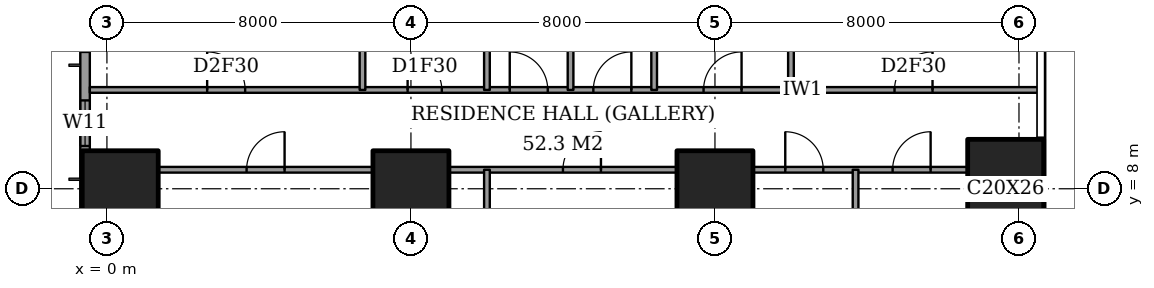
"""IFC4 building model, lengths in metres.
Left out: names, types, materials, properties, quantities, classifications, styles, units other than length and angle.
Written with IfcOpenShell. Run it as: python <this file> out.ifc"""

import sys

from ifc_helpers import new_model, si_unit, direction, frame, frame_2d, origin, origin_2d, place, context, subcontext, project, spatial, rectangle, extrude, element, fill, save


model = new_model("IFC4")
c1 = context("Model", 3, precision=1e-05, world=origin(), true_north=direction((0.0, 1.0)))
c2 = subcontext(c1, "Body", "Model", "MODEL_VIEW")
j1 = project(units=[si_unit("LENGTHUNIT", "METRE"), si_unit("PLANEANGLEUNIT", "RADIAN")], contexts=[c1])
p1 = place(None, origin())
s1 = spatial("IfcSite", under=j1, at=p1, CompositionType="ELEMENT")
p2 = place(p1, origin())
s2 = spatial("IfcBuilding", under=s1, at=p2, CompositionType="ELEMENT")
p3 = place(p2, frame((0.0, 0.0, 121.4)))
s3 = spatial("IfcBuildingStorey", under=s2, at=p3, CompositionType="ELEMENT", Elevation=121.4)
for number, where, z_axis, x_axis in (
    (1, (0.35, 8.0, 0.0), (0.0, 0.0, 1.0), (1.0, 0.0, 0.0)),
    (2, (8.0, 8.0, 0.0), (0.0, 0.0, 1.0), (1.0, 0.0, 0.0)),
    (3, (16.0, 8.0, 0.0), (0.0, 0.0, 1.0), (1.0, 0.0, 0.0)),
):
    element("IfcColumn", number, at=place(p3, frame(where, z_axis=z_axis, x_axis=x_axis)), inside=s3, PredefinedType="COLUMN", context=c2, shape_type="SweptSolid", body=[
        extrude(rectangle(XDim=2.0, YDim=2.0, at=origin_2d()), origin(), (0.0, 0.0, 1.0), 3.6),
    ])
p4 = place(p3, frame((23.65, 8.0, 0.0), z_axis=(0.0, 0.0, 1.0), x_axis=(1.0, 0.0, 0.0)))
e4 = element("IfcColumn", 4, at=p4, inside=s3, PredefinedType="COLUMN", context=c2, shape_type="SweptSolid", body=[
    extrude(rectangle(XDim=2.0, YDim=2.6, at=origin_2d()), origin(), (0.0, 0.0, 1.0), 3.6),
])
p5 = place(p3, frame((-0.575, 44.825, 0.0), z_axis=(0.0, 0.0, 1.0), x_axis=(0.0, -1.0, 0.0)))
e5 = element("IfcWall", 5, at=p5, inside=s3, PredefinedType="SOLIDWALL", context=c2, shape_type="SweptSolid", body=[
    extrude(rectangle(XDim=41.65, YDim=0.25, at=frame_2d((20.825, 0.0))), origin(), (0.0, 0.0, 1.0), 3.6),
])
p6 = place(p5, frame((0.775, 0.0, 0.4)))
e6 = element("IfcOpeningElement", 6, at=p6, cuts=e5, PredefinedType="OPENING", context=c2, shape_type="SweptSolid", body=[
    extrude(rectangle(XDim=2.4, YDim=2.2, at=frame_2d((1.2, 1.1))), frame((0.0, 0.135, 0.0), z_axis=(0.0, -1.0, 0.0), x_axis=(1.0, 0.0, 0.0)), (0.0, 0.0, 1.0), 0.27),
])
p7 = place(p5, frame((6.1, 0.0, 0.4)))
e7 = element("IfcOpeningElement", 7, at=p7, cuts=e5, PredefinedType="OPENING", context=c2, shape_type="SweptSolid", body=[
    extrude(rectangle(XDim=1.2, YDim=2.2, at=frame_2d((0.6, 1.1))), frame((0.0, 0.135, 0.0), z_axis=(0.0, -1.0, 0.0), x_axis=(1.0, 0.0, 0.0)), (0.0, 0.0, 1.0), 0.27),
])
p8 = place(p5, frame((8.225, 0.0, 0.4)))
e8 = element("IfcOpeningElement", 8, at=p8, cuts=e5, PredefinedType="OPENING", context=c2, shape_type="SweptSolid", body=[
    extrude(rectangle(XDim=2.4, YDim=2.2, at=frame_2d((1.2, 1.1))), frame((0.0, 0.135, 0.0), z_axis=(0.0, -1.0, 0.0), x_axis=(1.0, 0.0, 0.0)), (0.0, 0.0, 1.0), 0.27),
])
p9 = place(p5, frame((15.625, 0.0, 0.4)))
e9 = element("IfcOpeningElement", 9, at=p9, cuts=e5, PredefinedType="OPENING", context=c2, shape_type="SweptSolid", body=[
    extrude(rectangle(XDim=2.4, YDim=2.2, at=frame_2d((1.2, 1.1))), frame((0.0, 0.135, 0.0), z_axis=(0.0, -1.0, 0.0), x_axis=(1.0, 0.0, 0.0)), (0.0, 0.0, 1.0), 0.27),
])
p10 = place(p5, frame((23.625, 0.0, 0.4)))
e10 = element("IfcOpeningElement", 10, at=p10, cuts=e5, PredefinedType="OPENING", context=c2, shape_type="SweptSolid", body=[
    extrude(rectangle(XDim=2.4, YDim=2.2, at=frame_2d((1.2, 1.1))), frame((0.0, 0.135, 0.0), z_axis=(0.0, -1.0, 0.0), x_axis=(1.0, 0.0, 0.0)), (0.0, 0.0, 1.0), 0.27),
])
p11 = place(p5, frame((30.825, 0.0, 0.4)))
e11 = element("IfcOpeningElement", 11, at=p11, cuts=e5, PredefinedType="OPENING", context=c2, shape_type="SweptSolid", body=[
    extrude(rectangle(XDim=2.4, YDim=2.2, at=frame_2d((1.2, 1.1))), frame((0.0, 0.135, 0.0), z_axis=(0.0, -1.0, 0.0), x_axis=(1.0, 0.0, 0.0)), (0.0, 0.0, 1.0), 0.27),
])
p12 = place(p5, frame((34.5, 0.0, 0.4)))
e12 = element("IfcOpeningElement", 12, at=p12, cuts=e5, PredefinedType="OPENING", context=c2, shape_type="SweptSolid", body=[
    extrude(rectangle(XDim=1.2, YDim=2.2, at=frame_2d((0.6, 1.1))), frame((0.0, 0.135, 0.0), z_axis=(0.0, -1.0, 0.0), x_axis=(1.0, 0.0, 0.0)), (0.0, 0.0, 1.0), 0.27),
])
p13 = place(p5, frame((38.475, 0.0, 0.4)))
e13 = element("IfcOpeningElement", 13, at=p13, cuts=e5, PredefinedType="OPENING", context=c2, shape_type="SweptSolid", body=[
    extrude(rectangle(XDim=2.4, YDim=2.2, at=frame_2d((1.2, 1.1))), frame((0.0, 0.135, 0.0), z_axis=(0.0, -1.0, 0.0), x_axis=(1.0, 0.0, 0.0)), (0.0, 0.0, 1.0), 0.27),
])
p14 = place(p3, frame((1.35, 8.5, 0.0), z_axis=(0.0, 0.0, 1.0), x_axis=(1.0, 0.0, 0.0)))
e14 = element("IfcWall", 14, at=p14, inside=s3, PredefinedType="PARTITIONING", context=c2, shape_type="SweptSolid", body=[
    extrude(rectangle(XDim=5.65, YDim=0.15, at=frame_2d((2.825, 0.0))), origin(), (0.0, 0.0, 1.0), 3.35),
])
p15 = place(p14, frame((2.325, 0.0, 0.0)))
e15 = element("IfcOpeningElement", 15, at=p15, cuts=e14, PredefinedType="OPENING", context=c2, shape_type="SweptSolid", body=[
    extrude(rectangle(XDim=1.0, YDim=2.1, at=frame_2d((0.5, 1.05))), frame((0.0, 0.085, 0.0), z_axis=(0.0, -1.0, 0.0), x_axis=(1.0, 0.0, 0.0)), (0.0, 0.0, 1.0), 0.17),
])
p16 = place(p3, frame((9.0, 8.5, 0.0), z_axis=(0.0, 0.0, 1.0), x_axis=(1.0, 0.0, 0.0)))
e16 = element("IfcWall", 16, at=p16, inside=s3, PredefinedType="PARTITIONING", context=c2, shape_type="SweptSolid", body=[
    extrude(rectangle(XDim=6.0, YDim=0.15, at=frame_2d((3.0, 0.0))), origin(), (0.0, 0.0, 1.0), 3.35),
])
p17 = place(p16, frame((3.0, 0.0, 0.0)))
e17 = element("IfcOpeningElement", 17, at=p17, cuts=e16, PredefinedType="OPENING", context=c2, shape_type="SweptSolid", body=[
    extrude(rectangle(XDim=1.0, YDim=2.1, at=frame_2d((0.5, 1.05))), frame((0.0, 0.085, 0.0), z_axis=(0.0, -1.0, 0.0), x_axis=(1.0, 0.0, 0.0)), (0.0, 0.0, 1.0), 0.17),
])
p18 = place(p3, frame((17.0, 8.5, 0.0), z_axis=(0.0, 0.0, 1.0), x_axis=(1.0, 0.0, 0.0)))
e18 = element("IfcWall", 18, at=p18, inside=s3, PredefinedType="PARTITIONING", context=c2, shape_type="SweptSolid", body=[
    extrude(rectangle(XDim=5.65, YDim=0.15, at=frame_2d((2.825, 0.0))), origin(), (0.0, 0.0, 1.0), 3.35),
])
p19 = place(p18, frame((0.85, 0.0, 0.0)))
e19 = element("IfcOpeningElement", 19, at=p19, cuts=e18, PredefinedType="OPENING", context=c2, shape_type="SweptSolid", body=[
    extrude(rectangle(XDim=1.0, YDim=2.1, at=frame_2d((0.5, 1.05))), frame((0.0, 0.085, 0.0), z_axis=(0.0, -1.0, 0.0), x_axis=(1.0, 0.0, 0.0)), (0.0, 0.0, 1.0), 0.17),
])
p20 = place(p18, frame((3.675, 0.0, 0.0)))
e20 = element("IfcOpeningElement", 20, at=p20, cuts=e18, PredefinedType="OPENING", context=c2, shape_type="SweptSolid", body=[
    extrude(rectangle(XDim=1.0, YDim=2.1, at=frame_2d((0.5, 1.05))), frame((0.0, 0.085, 0.0), z_axis=(0.0, -1.0, 0.0), x_axis=(1.0, 0.0, 0.0)), (0.0, 0.0, 1.0), 0.17),
])
p21 = place(p3, frame((-0.45, 10.6, 0.0), z_axis=(0.0, 0.0, 1.0), x_axis=(1.0, 0.0, 0.0)))
e21 = element("IfcWall", 21, at=p21, inside=s3, PredefinedType="PARTITIONING", context=c2, shape_type="SweptSolid", body=[
    extrude(rectangle(XDim=25.011, YDim=0.15, at=frame_2d((12.505, 0.0))), origin(), (0.0, 0.0, 1.0), 3.35),
])
p22 = place(p21, frame((13.25, 0.0, 0.0)))
e22 = element("IfcOpeningElement", 22, at=p22, cuts=e21, PredefinedType="OPENING", context=c2, shape_type="SweptSolid", body=[
    extrude(rectangle(XDim=1.0, YDim=2.1, at=frame_2d((0.5, 1.05))), frame((0.0, 0.085, 0.0), z_axis=(0.0, -1.0, 0.0), x_axis=(1.0, 0.0, 0.0)), (0.0, 0.0, 1.0), 0.17),
])
p23 = place(p21, frame((3.087, 0.0, 0.0)))
e23 = element("IfcOpeningElement", 23, at=p23, cuts=e21, PredefinedType="OPENING", context=c2, shape_type="SweptSolid", body=[
    extrude(rectangle(XDim=1.0, YDim=2.1, at=frame_2d((0.5, 1.05))), frame((0.0, 0.085, 0.0), z_axis=(0.0, -1.0, 0.0), x_axis=(1.0, 0.0, 0.0)), (0.0, 0.0, 1.0), 0.17),
])
p24 = place(p21, frame((8.363, 0.0, 0.0)))
e24 = element("IfcOpeningElement", 24, at=p24, cuts=e21, PredefinedType="OPENING", context=c2, shape_type="SweptSolid", body=[
    extrude(rectangle(XDim=0.9, YDim=2.1, at=frame_2d((0.45, 1.05))), frame((0.0, 0.085, 0.0), z_axis=(0.0, -1.0, 0.0), x_axis=(1.0, 0.0, 0.0)), (0.0, 0.0, 1.0), 0.17),
])
p25 = place(p21, frame((11.05, 0.0, 0.0)))
e25 = element("IfcOpeningElement", 25, at=p25, cuts=e21, PredefinedType="OPENING", context=c2, shape_type="SweptSolid", body=[
    extrude(rectangle(XDim=1.0, YDim=2.1, at=frame_2d((0.5, 1.05))), frame((0.0, 0.085, 0.0), z_axis=(0.0, -1.0, 0.0), x_axis=(1.0, 0.0, 0.0)), (0.0, 0.0, 1.0), 0.17),
])
p26 = place(p21, frame((16.15, 0.0, 0.0)))
e26 = element("IfcOpeningElement", 26, at=p26, cuts=e21, PredefinedType="OPENING", context=c2, shape_type="SweptSolid", body=[
    extrude(rectangle(XDim=1.0, YDim=2.1, at=frame_2d((0.5, 1.05))), frame((0.0, 0.085, 0.0), z_axis=(0.0, -1.0, 0.0), x_axis=(1.0, 0.0, 0.0)), (0.0, 0.0, 1.0), 0.17),
])
p27 = place(p21, frame((21.175, 0.0, 0.0)))
e27 = element("IfcOpeningElement", 27, at=p27, cuts=e21, PredefinedType="OPENING", context=c2, shape_type="SweptSolid", body=[
    extrude(rectangle(XDim=1.0, YDim=2.1, at=frame_2d((0.5, 1.05))), frame((0.0, 0.085, 0.0), z_axis=(0.0, -1.0, 0.0), x_axis=(1.0, 0.0, 0.0)), (0.0, 0.0, 1.0), 0.17),
])
p28 = place(p3, frame((6.725, 10.6, 0.0), z_axis=(0.0, 0.0, 1.0), x_axis=(0.0, 1.0, 0.0)))
e28 = element("IfcWall", 28, at=p28, inside=s3, PredefinedType="PARTITIONING", context=c2, shape_type="SweptSolid", body=[
    extrude(rectangle(XDim=4.2, YDim=0.15, at=frame_2d((2.1, 0.0))), origin(), (0.0, 0.0, 1.0), 3.35),
])
p29 = place(p3, frame((10.0, -0.45, 0.0), z_axis=(0.0, 0.0, 1.0), x_axis=(0.0, 1.0, 0.0)))
e29 = element("IfcWall", 29, at=p29, inside=s3, PredefinedType="PARTITIONING", context=c2, shape_type="SweptSolid", body=[
    extrude(rectangle(XDim=8.95, YDim=0.15, at=frame_2d((4.475, 0.0))), origin(), (0.0, 0.0, 1.0), 3.35),
])
p30 = place(p3, frame((10.0, 10.6, 0.0), z_axis=(0.0, 0.0, 1.0), x_axis=(0.0, 1.0, 0.0)))
e30 = element("IfcWall", 30, at=p30, inside=s3, PredefinedType="PARTITIONING", context=c2, shape_type="SweptSolid", body=[
    extrude(rectangle(XDim=11.0, YDim=0.15, at=frame_2d((5.5, 0.0))), origin(), (0.0, 0.0, 1.0), 3.35),
])
p31 = place(p30, frame((8.2, 0.0, 0.0)))
e31 = element("IfcOpeningElement", 31, at=p31, cuts=e30, PredefinedType="OPENING", context=c2, shape_type="SweptSolid", body=[
    extrude(rectangle(XDim=1.0, YDim=2.1, at=frame_2d((0.5, 1.05))), frame((0.0, 0.085, 0.0), z_axis=(0.0, -1.0, 0.0), x_axis=(1.0, 0.0, 0.0)), (0.0, 0.0, 1.0), 0.17),
])
for number, where, z_axis, x_axis in (
    (32, (12.2, 10.6, 0.0), (0.0, 0.0, 1.0), (0.0, 1.0, 0.0)),
    (33, (14.4, 10.6, 0.0), (0.0, 0.0, 1.0), (0.0, 1.0, 0.0)),
    (34, (18.0, 10.6, 0.0), (0.0, 0.0, 1.0), (0.0, 1.0, 0.0)),
):
    element("IfcWall", number, at=place(p3, frame(where, z_axis=z_axis, x_axis=x_axis)), inside=s3, PredefinedType="PARTITIONING", context=c2, shape_type="SweptSolid", body=[
        extrude(rectangle(XDim=6.4, YDim=0.15, at=frame_2d((3.2, 0.0))), origin(), (0.0, 0.0, 1.0), 3.35),
    ])
p32 = place(p3, frame((19.7, -0.45, 0.0), z_axis=(0.0, 0.0, 1.0), x_axis=(0.0, 1.0, 0.0)))
e35 = element("IfcWall", 35, at=p32, inside=s3, PredefinedType="PARTITIONING", context=c2, shape_type="SweptSolid", body=[
    extrude(rectangle(XDim=8.95, YDim=0.15, at=frame_2d((4.475, 0.0))), origin(), (0.0, 0.0, 1.0), 3.35),
])
p33 = place(p12, origin())
e36 = element("IfcWindow", 36, at=p33, inside=s3, PartitioningType="SINGLE_PANEL", PredefinedType="WINDOW", context=c2, shape_type="SweptSolid", body=[
    extrude(rectangle(XDim=1.2, YDim=2.2, at=frame_2d((0.6, 1.1))), frame((0.0, 0.03, 0.0), z_axis=(0.0, -1.0, 0.0), x_axis=(1.0, 0.0, 0.0)), (0.0, 0.0, 1.0), 0.06),
])
fill(e12, e36)
p34 = place(p15, origin())
e37 = element("IfcDoor", 37, at=p34, inside=s3, OperationType="SINGLE_SWING_LEFT", PredefinedType="DOOR", context=c2, shape_type="SweptSolid", body=[
    extrude(rectangle(XDim=1.0, YDim=2.1, at=frame_2d((0.5, 1.05))), frame((0.0, 0.025, 0.0), z_axis=(0.0, -1.0, 0.0), x_axis=(1.0, 0.0, 0.0)), (0.0, 0.0, 1.0), 0.05),
])
fill(e15, e37)
p35 = place(p17, origin())
e38 = element("IfcDoor", 38, at=p35, inside=s3, OperationType="SINGLE_SWING_LEFT", PredefinedType="DOOR", context=c2, shape_type="SweptSolid", body=[
    extrude(rectangle(XDim=1.0, YDim=2.1, at=frame_2d((0.5, 1.05))), frame((0.0, 0.025, 0.0), z_axis=(0.0, -1.0, 0.0), x_axis=(1.0, 0.0, 0.0)), (0.0, 0.0, 1.0), 0.05),
])
fill(e17, e38)
p36 = place(p19, origin())
e39 = element("IfcDoor", 39, at=p36, inside=s3, OperationType="SINGLE_SWING_RIGHT", PredefinedType="DOOR", context=c2, shape_type="SweptSolid", body=[
    extrude(rectangle(XDim=1.0, YDim=2.1, at=frame_2d((0.5, 1.05))), frame((0.0, 0.025, 0.0), z_axis=(0.0, -1.0, 0.0), x_axis=(1.0, 0.0, 0.0)), (0.0, 0.0, 1.0), 0.05),
])
fill(e19, e39)
p37 = place(p20, origin())
e40 = element("IfcDoor", 40, at=p37, inside=s3, OperationType="SINGLE_SWING_LEFT", PredefinedType="DOOR", context=c2, shape_type="SweptSolid", body=[
    extrude(rectangle(XDim=1.0, YDim=2.1, at=frame_2d((0.5, 1.05))), frame((0.0, 0.025, 0.0), z_axis=(0.0, -1.0, 0.0), x_axis=(1.0, 0.0, 0.0)), (0.0, 0.0, 1.0), 0.05),
])
fill(e20, e40)
p38 = place(p22, origin())
e41 = element("IfcDoor", 41, at=p38, inside=s3, OperationType="SINGLE_SWING_LEFT", PredefinedType="DOOR", context=c2, shape_type="SweptSolid", body=[
    extrude(rectangle(XDim=1.0, YDim=2.1, at=frame_2d((0.5, 1.05))), frame((0.0, 0.025, 0.0), z_axis=(0.0, -1.0, 0.0), x_axis=(1.0, 0.0, 0.0)), (0.0, 0.0, 1.0), 0.05),
])
fill(e22, e41)
p39 = place(p23, origin())
e42 = element("IfcDoor", 42, at=p39, inside=s3, OperationType="SINGLE_SWING_RIGHT", PredefinedType="DOOR", context=c2, shape_type="SweptSolid", body=[
    extrude(rectangle(XDim=1.0, YDim=2.1, at=frame_2d((0.5, 1.05))), frame((0.0, 0.025, 0.0), z_axis=(0.0, -1.0, 0.0), x_axis=(1.0, 0.0, 0.0)), (0.0, 0.0, 1.0), 0.05),
])
fill(e23, e42)
p40 = place(p24, origin())
e43 = element("IfcDoor", 43, at=p40, inside=s3, OperationType="SINGLE_SWING_RIGHT", PredefinedType="DOOR", context=c2, shape_type="SweptSolid", body=[
    extrude(rectangle(XDim=0.9, YDim=2.1, at=frame_2d((0.45, 1.05))), frame((0.0, 0.025, 0.0), z_axis=(0.0, -1.0, 0.0), x_axis=(1.0, 0.0, 0.0)), (0.0, 0.0, 1.0), 0.05),
])
fill(e24, e43)
p41 = place(p25, origin())
e44 = element("IfcDoor", 44, at=p41, inside=s3, OperationType="SINGLE_SWING_RIGHT", PredefinedType="DOOR", context=c2, shape_type="SweptSolid", body=[
    extrude(rectangle(XDim=1.0, YDim=2.1, at=frame_2d((0.5, 1.05))), frame((0.0, 0.025, 0.0), z_axis=(0.0, -1.0, 0.0), x_axis=(1.0, 0.0, 0.0)), (0.0, 0.0, 1.0), 0.05),
])
fill(e25, e44)
p42 = place(p26, origin())
e45 = element("IfcDoor", 45, at=p42, inside=s3, OperationType="SINGLE_SWING_LEFT", PredefinedType="DOOR", context=c2, shape_type="SweptSolid", body=[
    extrude(rectangle(XDim=1.0, YDim=2.1, at=frame_2d((0.5, 1.05))), frame((0.0, 0.025, 0.0), z_axis=(0.0, -1.0, 0.0), x_axis=(1.0, 0.0, 0.0)), (0.0, 0.0, 1.0), 0.05),
])
fill(e26, e45)
p43 = place(p27, origin())
e46 = element("IfcDoor", 46, at=p43, inside=s3, OperationType="SINGLE_SWING_LEFT", PredefinedType="DOOR", context=c2, shape_type="SweptSolid", body=[
    extrude(rectangle(XDim=1.0, YDim=2.1, at=frame_2d((0.5, 1.05))), frame((0.0, 0.025, 0.0), z_axis=(0.0, -1.0, 0.0), x_axis=(1.0, 0.0, 0.0)), (0.0, 0.0, 1.0), 0.05),
])
fill(e27, e46)
save(model, sys.argv[1])
